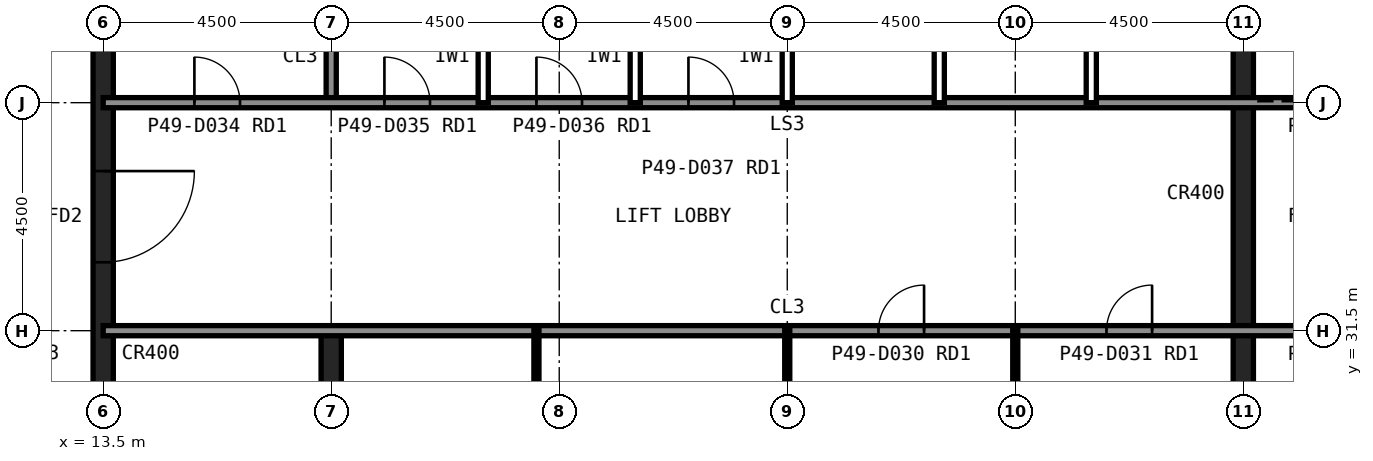
"""IFC4 building model, lengths in metres.
Left out: names, types, materials, properties, quantities, classifications, styles, units other than length and angle.
Written with IfcOpenShell. Run it as: python <this file> out.ifc"""

import sys

from ifc_helpers import new_model, si_unit, direction, frame, frame_2d, origin, place, context, subcontext, project, spatial, rectangle, extrude, element, fill, save


model = new_model("IFC4")
c1 = context("Model", 3, precision=1e-05, world=origin(), true_north=direction((0.0, 1.0)))
c2 = subcontext(c1, "Body", "Model", "MODEL_VIEW")
j1 = project(units=[si_unit("LENGTHUNIT", "METRE"), si_unit("PLANEANGLEUNIT", "RADIAN")], contexts=[c1])
p1 = place(None, origin())
s1 = spatial("IfcSite", under=j1, at=p1, CompositionType="ELEMENT")
p2 = place(p1, origin())
s2 = spatial("IfcBuilding", under=s1, at=p2, CompositionType="ELEMENT")
p3 = place(p2, frame((0.0, 0.0, 210.6)))
s3 = spatial("IfcBuildingStorey", under=s2, at=p3, CompositionType="ELEMENT", Elevation=210.6)
p4 = place(p3, frame((13.5, 40.5, 0.0), z_axis=(0.0, 0.0, 1.0), x_axis=(0.0, -1.0, 0.0)))
e1 = element("IfcWall", 1, at=p4, inside=s3, PredefinedType="SHEAR", context=c2, shape_type="SweptSolid", body=[
    extrude(rectangle(XDim=27.0, YDim=0.4, at=frame_2d((13.5, 0.0))), origin(), (0.0, 0.0, 1.0), 4.0),
])
p5 = place(p4, frame((19.65, 0.0, 0.0)))
e2 = element("IfcOpeningElement", 2, at=p5, cuts=e1, PredefinedType="OPENING", context=c2, shape_type="SweptSolid", body=[
    extrude(rectangle(XDim=1.2, YDim=2.1, at=frame_2d((0.6, 1.05))), frame((0.0, 0.21, 0.0), z_axis=(0.0, -1.0, 0.0), x_axis=(1.0, 0.0, 0.0)), (0.0, 0.0, 1.0), 0.42),
])
p6 = place(p4, frame((5.85, 0.0, 0.0)))
e3 = element("IfcOpeningElement", 3, at=p6, cuts=e1, PredefinedType="OPENING", context=c2, shape_type="SweptSolid", body=[
    extrude(rectangle(XDim=1.8, YDim=2.1, at=frame_2d((0.9, 1.05))), frame((0.0, 0.21, 0.0), z_axis=(0.0, -1.0, 0.0), x_axis=(1.0, 0.0, 0.0)), (0.0, 0.0, 1.0), 0.42),
])
p7 = place(p3, frame((18.0, 13.5, 0.0), z_axis=(0.0, 0.0, 1.0), x_axis=(0.0, 1.0, 0.0)))
e4 = element("IfcWall", 4, at=p7, inside=s3, PredefinedType="SHEAR", context=c2, shape_type="SweptSolid", body=[
    extrude(rectangle(XDim=18.0, YDim=0.4, at=frame_2d((9.0, 0.0))), origin(), (0.0, 0.0, 1.0), 4.0),
])
p8 = place(p3, frame((18.0, 36.0, 0.0), z_axis=(0.0, 0.0, 1.0), x_axis=(0.0, 1.0, 0.0)))
e5 = element("IfcWall", 5, at=p8, inside=s3, PredefinedType="SOLIDWALL", context=c2, shape_type="SweptSolid", body=[
    extrude(rectangle(XDim=4.5, YDim=0.2, at=frame_2d((2.25, 0.0))), origin(), (0.0, 0.0, 1.0), 3.84),
])
p9 = place(p3, frame((36.0, 22.5, 0.0), z_axis=(0.0, 0.0, 1.0), x_axis=(0.0, 1.0, 0.0)))
e6 = element("IfcWall", 6, at=p9, inside=s3, PredefinedType="SHEAR", context=c2, shape_type="SweptSolid", body=[
    extrude(rectangle(XDim=18.0, YDim=0.4, at=frame_2d((9.0, 0.0))), origin(), (0.0, 0.0, 1.0), 4.0),
])
p10 = place(p3, frame((13.5, 36.0, 0.0), z_axis=(0.0, 0.0, 1.0), x_axis=(1.0, 0.0, 0.0)))
e7 = element("IfcWall", 7, at=p10, inside=s3, PredefinedType="SOLIDWALL", context=c2, shape_type="SweptSolid", body=[
    extrude(rectangle(XDim=27.0, YDim=0.2, at=frame_2d((13.5, 0.0))), origin(), (0.0, 0.0, 1.0), 3.84),
])
p11 = place(p10, frame((1.8, 0.0, 0.0)))
e8 = element("IfcOpeningElement", 8, at=p11, cuts=e7, PredefinedType="OPENING", context=c2, shape_type="SweptSolid", body=[
    extrude(rectangle(XDim=0.9, YDim=2.1, at=frame_2d((0.45, 1.05))), frame((0.0, 0.11, 0.0), z_axis=(0.0, -1.0, 0.0), x_axis=(1.0, 0.0, 0.0)), (0.0, 0.0, 1.0), 0.22),
])
p12 = place(p10, frame((5.55, 0.0, 0.0)))
e9 = element("IfcOpeningElement", 9, at=p12, cuts=e7, PredefinedType="OPENING", context=c2, shape_type="SweptSolid", body=[
    extrude(rectangle(XDim=0.9, YDim=2.1, at=frame_2d((0.45, 1.05))), frame((0.0, 0.11, 0.0), z_axis=(0.0, -1.0, 0.0), x_axis=(1.0, 0.0, 0.0)), (0.0, 0.0, 1.0), 0.22),
])
p13 = place(p10, frame((8.55, 0.0, 0.0)))
e10 = element("IfcOpeningElement", 10, at=p13, cuts=e7, PredefinedType="OPENING", context=c2, shape_type="SweptSolid", body=[
    extrude(rectangle(XDim=0.9, YDim=2.1, at=frame_2d((0.45, 1.05))), frame((0.0, 0.11, 0.0), z_axis=(0.0, -1.0, 0.0), x_axis=(1.0, 0.0, 0.0)), (0.0, 0.0, 1.0), 0.22),
])
p14 = place(p10, frame((11.55, 0.0, 0.0)))
e11 = element("IfcOpeningElement", 11, at=p14, cuts=e7, PredefinedType="OPENING", context=c2, shape_type="SweptSolid", body=[
    extrude(rectangle(XDim=0.9, YDim=2.1, at=frame_2d((0.45, 1.05))), frame((0.0, 0.11, 0.0), z_axis=(0.0, -1.0, 0.0), x_axis=(1.0, 0.0, 0.0)), (0.0, 0.0, 1.0), 0.22),
])
p15 = place(p10, frame((24.1, 0.0, 0.0)))
e12 = element("IfcOpeningElement", 12, at=p15, cuts=e7, PredefinedType="OPENING", context=c2, shape_type="SweptSolid", body=[
    extrude(rectangle(XDim=1.3, YDim=2.2, at=frame_2d((0.65, 1.1))), frame((0.0, 0.11, 0.0), z_axis=(0.0, -1.0, 0.0), x_axis=(1.0, 0.0, 0.0)), (0.0, 0.0, 1.0), 0.22),
])
p16 = place(p3, frame((13.5, 31.5, 0.0), z_axis=(0.0, 0.0, 1.0), x_axis=(1.0, 0.0, 0.0)))
e13 = element("IfcWall", 13, at=p16, inside=s3, PredefinedType="SOLIDWALL", context=c2, shape_type="SweptSolid", body=[
    extrude(rectangle(XDim=27.0, YDim=0.2, at=frame_2d((13.5, 0.0))), origin(), (0.0, 0.0, 1.0), 3.84),
])
p17 = place(p16, frame((24.15, 0.0, 0.0)))
e14 = element("IfcOpeningElement", 14, at=p17, cuts=e13, PredefinedType="OPENING", context=c2, shape_type="SweptSolid", body=[
    extrude(rectangle(XDim=1.2, YDim=2.1, at=frame_2d((0.6, 1.05))), frame((0.0, 0.11, 0.0), z_axis=(0.0, -1.0, 0.0), x_axis=(1.0, 0.0, 0.0)), (0.0, 0.0, 1.0), 0.22),
])
p18 = place(p16, frame((15.3, 0.0, 0.0)))
e15 = element("IfcOpeningElement", 15, at=p18, cuts=e13, PredefinedType="OPENING", context=c2, shape_type="SweptSolid", body=[
    extrude(rectangle(XDim=0.9, YDim=2.1, at=frame_2d((0.45, 1.05))), frame((0.0, 0.11, 0.0), z_axis=(0.0, -1.0, 0.0), x_axis=(1.0, 0.0, 0.0)), (0.0, 0.0, 1.0), 0.22),
])
p19 = place(p16, frame((19.8, 0.0, 0.0)))
e16 = element("IfcOpeningElement", 16, at=p19, cuts=e13, PredefinedType="OPENING", context=c2, shape_type="SweptSolid", body=[
    extrude(rectangle(XDim=0.9, YDim=2.1, at=frame_2d((0.45, 1.05))), frame((0.0, 0.11, 0.0), z_axis=(0.0, -1.0, 0.0), x_axis=(1.0, 0.0, 0.0)), (0.0, 0.0, 1.0), 0.22),
])
for number, where, z_axis, x_axis in (
    (17, (21.0, 36.0, 0.0), (0.0, 0.0, 1.0), (0.0, 1.0, 0.0)),
    (18, (24.0, 36.0, 0.0), (0.0, 0.0, 1.0), (0.0, 1.0, 0.0)),
    (19, (27.0, 36.0, 0.0), (0.0, 0.0, 1.0), (0.0, 1.0, 0.0)),
    (20, (30.0, 36.0, 0.0), (0.0, 0.0, 1.0), (0.0, 1.0, 0.0)),
    (21, (33.0, 36.0, 0.0), (0.0, 0.0, 1.0), (0.0, 1.0, 0.0)),
):
    element("IfcWall", number, at=place(p3, frame(where, z_axis=z_axis, x_axis=x_axis)), inside=s3, PredefinedType="PARTITIONING", context=c2, shape_type="SweptSolid", body=[
        extrude(rectangle(XDim=4.5, YDim=0.2, at=frame_2d((2.25, 0.0))), origin(), (0.0, 0.0, 1.0), 3.84),
    ])
for number, where, z_axis, x_axis in (
    (22, (22.05, 22.5, 0.0), (0.0, 0.0, 1.0), (0.0, 1.0, 0.0)),
    (23, (27.0, 22.5, 0.0), (0.0, 0.0, 1.0), (0.0, 1.0, 0.0)),
    (24, (31.5, 22.5, 0.0), (0.0, 0.0, 1.0), (0.0, 1.0, 0.0)),
):
    element("IfcWall", number, at=place(p3, frame(where, z_axis=z_axis, x_axis=x_axis)), inside=s3, PredefinedType="PLUMBINGWALL", context=c2, shape_type="SweptSolid", body=[
        extrude(rectangle(XDim=9.0, YDim=0.1, at=frame_2d((4.5, 0.0))), origin(), (0.0, 0.0, 1.0), 3.84),
    ])
p20 = place(p6, origin())
e25 = element("IfcDoor", 25, at=p20, inside=s3, OperationType="SINGLE_SWING_LEFT", PredefinedType="DOOR", context=c2, shape_type="SweptSolid", body=[
    extrude(rectangle(XDim=1.8, YDim=2.1, at=frame_2d((0.9, 1.05))), frame((0.0, 0.025, 0.0), z_axis=(0.0, -1.0, 0.0), x_axis=(1.0, 0.0, 0.0)), (0.0, 0.0, 1.0), 0.05),
])
fill(e3, e25)
p21 = place(p18, origin())
e26 = element("IfcDoor", 26, at=p21, inside=s3, OperationType="SINGLE_SWING_RIGHT", PredefinedType="DOOR", context=c2, shape_type="SweptSolid", body=[
    extrude(rectangle(XDim=0.9, YDim=2.1, at=frame_2d((0.45, 1.05))), frame((0.0, 0.025, 0.0), z_axis=(0.0, -1.0, 0.0), x_axis=(1.0, 0.0, 0.0)), (0.0, 0.0, 1.0), 0.05),
])
fill(e15, e26)
p22 = place(p19, origin())
e27 = element("IfcDoor", 27, at=p22, inside=s3, OperationType="SINGLE_SWING_RIGHT", PredefinedType="DOOR", context=c2, shape_type="SweptSolid", body=[
    extrude(rectangle(XDim=0.9, YDim=2.1, at=frame_2d((0.45, 1.05))), frame((0.0, 0.025, 0.0), z_axis=(0.0, -1.0, 0.0), x_axis=(1.0, 0.0, 0.0)), (0.0, 0.0, 1.0), 0.05),
])
fill(e16, e27)
p23 = place(p11, origin())
e28 = element("IfcDoor", 28, at=p23, inside=s3, OperationType="SINGLE_SWING_LEFT", PredefinedType="DOOR", context=c2, shape_type="SweptSolid", body=[
    extrude(rectangle(XDim=0.9, YDim=2.1, at=frame_2d((0.45, 1.05))), frame((0.0, 0.025, 0.0), z_axis=(0.0, -1.0, 0.0), x_axis=(1.0, 0.0, 0.0)), (0.0, 0.0, 1.0), 0.05),
])
fill(e8, e28)
p24 = place(p12, origin())
e29 = element("IfcDoor", 29, at=p24, inside=s3, OperationType="SINGLE_SWING_LEFT", PredefinedType="DOOR", context=c2, shape_type="SweptSolid", body=[
    extrude(rectangle(XDim=0.9, YDim=2.1, at=frame_2d((0.45, 1.05))), frame((0.0, 0.025, 0.0), z_axis=(0.0, -1.0, 0.0), x_axis=(1.0, 0.0, 0.0)), (0.0, 0.0, 1.0), 0.05),
])
fill(e9, e29)
p25 = place(p13, origin())
e30 = element("IfcDoor", 30, at=p25, inside=s3, OperationType="SINGLE_SWING_LEFT", PredefinedType="DOOR", context=c2, shape_type="SweptSolid", body=[
    extrude(rectangle(XDim=0.9, YDim=2.1, at=frame_2d((0.45, 1.05))), frame((0.0, 0.025, 0.0), z_axis=(0.0, -1.0, 0.0), x_axis=(1.0, 0.0, 0.0)), (0.0, 0.0, 1.0), 0.05),
])
fill(e10, e30)
p26 = place(p14, origin())
e31 = element("IfcDoor", 31, at=p26, inside=s3, OperationType="SINGLE_SWING_LEFT", PredefinedType="DOOR", context=c2, shape_type="SweptSolid", body=[
    extrude(rectangle(XDim=0.9, YDim=2.1, at=frame_2d((0.45, 1.05))), frame((0.0, 0.025, 0.0), z_axis=(0.0, -1.0, 0.0), x_axis=(1.0, 0.0, 0.0)), (0.0, 0.0, 1.0), 0.05),
])
fill(e11, e31)
save(model, sys.argv[1])
